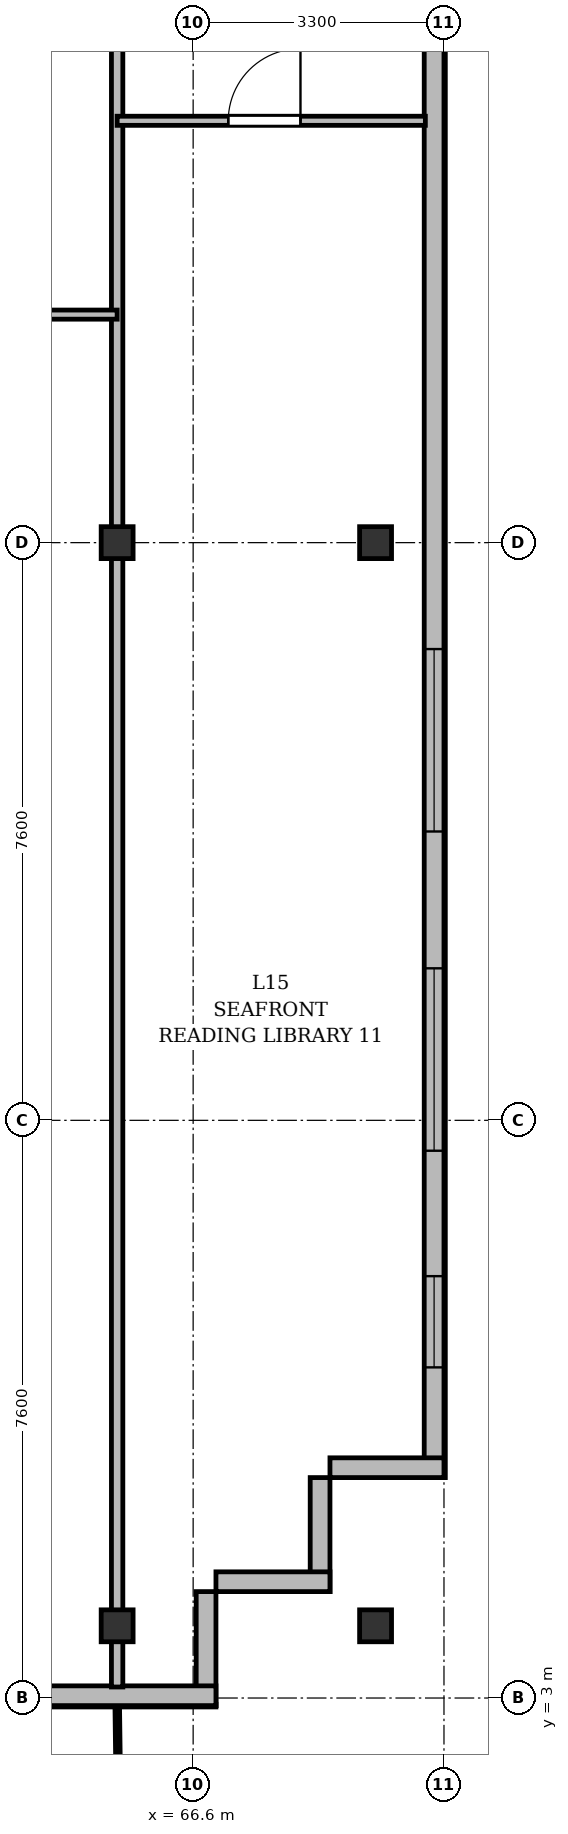
"""IFC4 building model, lengths in metres.
Left out: names, types, materials, properties, quantities, classifications, styles, units other than length and angle.
Written with IfcOpenShell. Run it as: python <this file> out.ifc"""

import sys

from ifc_helpers import new_model, si_unit, direction, frame, frame_2d, origin, origin_2d, place, context, subcontext, project, spatial, rectangle, i_section, extrude, source, transform, mapped, element, fill, save


model = new_model("IFC4")
c1 = context("Model", 3, precision=1e-05, world=origin(), true_north=direction((0.0, 1.0)))
c2 = subcontext(c1, "Body", "Model", "MODEL_VIEW")
j1 = project(units=[si_unit("LENGTHUNIT", "METRE"), si_unit("PLANEANGLEUNIT", "RADIAN")], contexts=[c1])
p1 = place(None, origin())
s1 = spatial("IfcSite", under=j1, at=p1, CompositionType="ELEMENT")
p2 = place(p1, origin())
s2 = spatial("IfcBuilding", under=s1, at=p2, CompositionType="ELEMENT")
p3 = place(p2, frame((0.0, 0.0, 59.5)))
s3 = spatial("IfcBuildingStorey", under=s2, at=p3, CompositionType="ELEMENT", Elevation=59.5)
m1 = source(origin(), c2, "Body", "SweptSolid", [
    extrude(i_section(OverallWidth=0.42, OverallDepth=0.42, WebThickness=0.026, FlangeThickness=0.04, at=origin_2d()), origin(), (0.0, 0.0, 1.0), 3.6),
])
for number, where, z_axis, x_axis in (
    (1, (65.6, 3.95, 0.0), (0.0, 0.0, 1.0), (1.0, 0.0, 0.0)),
    (2, (65.6, 18.2, 0.0), (0.0, 0.0, 1.0), (1.0, 0.0, 0.0)),
    (3, (69.0, 3.95, 0.0), (0.0, 0.0, 1.0), (1.0, 0.0, 0.0)),
    (4, (69.0, 18.2, 0.0), (0.0, 0.0, 1.0), (1.0, 0.0, 0.0)),
):
    element("IfcColumn", number, at=place(p3, frame(where, z_axis=z_axis, x_axis=x_axis)), inside=s3, PredefinedType="COLUMN", context=c2, shape_type="MappedRepresentation", body=[
        mapped(m1, transform((0.0, 0.0, 0.0), x_axis=(1.0, 0.0, 0.0), y_axis=(0.0, 1.0, 0.0), z_axis=(0.0, 0.0, 1.0), scale=1.0)),
    ])
p4 = place(p3, frame((69.77, 45.5, 0.0), z_axis=(0.0, 0.0, 1.0), x_axis=(0.0, -1.0, 0.0)))
e5 = element("IfcWall", 5, at=p4, inside=s3, PredefinedType="SOLIDWALL", context=c2, shape_type="SweptSolid", body=[
    extrude(rectangle(XDim=39.6, YDim=0.26, at=frame_2d((19.8, 0.0))), origin(), (0.0, 0.0, 1.0), 3.34),
])
p5 = place(p4, frame((36.95, 0.0, 0.92)))
e6 = element("IfcOpeningElement", 6, at=p5, cuts=e5, PredefinedType="OPENING", context=c2, shape_type="SweptSolid", body=[
    extrude(rectangle(XDim=1.2, YDim=1.65, at=frame_2d((0.6, 0.825))), frame((0.0, 0.14, 0.0), z_axis=(0.0, -1.0, 0.0), x_axis=(1.0, 0.0, 0.0)), (0.0, 0.0, 1.0), 0.28),
])
p6 = place(p4, frame((32.9, 0.0, 0.92)))
e7 = element("IfcOpeningElement", 7, at=p6, cuts=e5, PredefinedType="OPENING", context=c2, shape_type="SweptSolid", body=[
    extrude(rectangle(XDim=2.4, YDim=2.1, at=frame_2d((1.2, 1.05))), frame((0.0, 0.14, 0.0), z_axis=(0.0, -1.0, 0.0), x_axis=(1.0, 0.0, 0.0)), (0.0, 0.0, 1.0), 0.28),
])
p7 = place(p4, frame((28.7, 0.0, 0.92)))
e8 = element("IfcOpeningElement", 8, at=p7, cuts=e5, PredefinedType="OPENING", context=c2, shape_type="SweptSolid", body=[
    extrude(rectangle(XDim=2.4, YDim=2.1, at=frame_2d((1.2, 1.05))), frame((0.0, 0.14, 0.0), z_axis=(0.0, -1.0, 0.0), x_axis=(1.0, 0.0, 0.0)), (0.0, 0.0, 1.0), 0.28),
])
p8 = place(p4, frame((7.5, 0.0, 0.92)))
e9 = element("IfcOpeningElement", 9, at=p8, cuts=e5, PredefinedType="OPENING", context=c2, shape_type="SweptSolid", body=[
    extrude(rectangle(XDim=2.4, YDim=2.1, at=frame_2d((1.2, 1.05))), frame((0.0, 0.14, 0.0), z_axis=(0.0, -1.0, 0.0), x_axis=(1.0, 0.0, 0.0)), (0.0, 0.0, 1.0), 0.28),
])
p9 = place(p4, frame((4.5, 0.0, 0.92)))
e10 = element("IfcOpeningElement", 10, at=p9, cuts=e5, PredefinedType="OPENING", context=c2, shape_type="SweptSolid", body=[
    extrude(rectangle(XDim=1.2, YDim=1.65, at=frame_2d((0.6, 0.825))), frame((0.0, 0.14, 0.0), z_axis=(0.0, -1.0, 0.0), x_axis=(1.0, 0.0, 0.0)), (0.0, 0.0, 1.0), 0.28),
])
p10 = place(p4, frame((1.15, 0.0, 0.92)))
e11 = element("IfcOpeningElement", 11, at=p10, cuts=e5, PredefinedType="OPENING", context=c2, shape_type="SweptSolid", body=[
    extrude(rectangle(XDim=1.2, YDim=1.65, at=frame_2d((0.6, 0.825))), frame((0.0, 0.14, 0.0), z_axis=(0.0, -1.0, 0.0), x_axis=(1.0, 0.0, 0.0)), (0.0, 0.0, 1.0), 0.28),
])
p11 = place(p3, frame((69.9, 6.03, 0.0), z_axis=(0.0, 0.0, 1.0), x_axis=(-1.0, 0.0, 0.0)))
e12 = element("IfcWall", 12, at=p11, inside=s3, PredefinedType="SOLIDWALL", context=c2, shape_type="SweptSolid", body=[
    extrude(rectangle(XDim=1.5, YDim=0.26, at=frame_2d((0.75, 0.0))), origin(), (0.0, 0.0, 1.0), 2.752),
])
for number, where, z_axis, x_axis in (
    (13, (68.27, 5.9, 0.0), (0.0, 0.0, 1.0), (0.0, -1.0, 0.0)),
    (14, (68.4, 4.53, 0.0), (0.0, 0.0, 1.0), (-1.0, 0.0, 0.0)),
):
    element("IfcWall", number, at=place(p3, frame(where, z_axis=z_axis, x_axis=x_axis)), inside=s3, PredefinedType="SOLIDWALL", context=c2, shape_type="SweptSolid", body=[
        extrude(rectangle(XDim=1.5, YDim=0.26, at=frame_2d((0.75, 0.0))), origin(), (0.0, 0.0, 1.0), 3.34),
    ])
p12 = place(p3, frame((66.77, 4.4, 0.0), z_axis=(0.0, 0.0, 1.0), x_axis=(0.0, -1.0, 0.0)))
e15 = element("IfcWall", 15, at=p12, inside=s3, PredefinedType="SOLIDWALL", context=c2, shape_type="SweptSolid", body=[
    extrude(rectangle(XDim=1.5, YDim=0.26, at=frame_2d((0.75, 0.0))), origin(), (0.0, 0.0, 1.0), 2.69),
])
p13 = place(p3, frame((66.9, 3.03, 0.0), z_axis=(0.0, 0.0, 1.0), x_axis=(-1.0, 0.0, 0.0)))
e16 = element("IfcWall", 16, at=p13, inside=s3, PredefinedType="SOLIDWALL", context=c2, shape_type="SweptSolid", body=[
    extrude(rectangle(XDim=59.4, YDim=0.26, at=frame_2d((29.7, 0.0))), origin(), (0.0, 0.0, 1.0), 3.34),
])
p14 = place(p13, frame((3.6, 0.0, 0.9)))
e17 = element("IfcOpeningElement", 17, at=p14, cuts=e16, PredefinedType="OPENING", context=c2, shape_type="SweptSolid", body=[
    extrude(rectangle(XDim=2.2, YDim=1.8, at=frame_2d((1.1, 0.9))), frame((0.0, 0.14, 0.0), z_axis=(0.0, -1.0, 0.0), x_axis=(1.0, 0.0, 0.0)), (0.0, 0.0, 1.0), 0.28),
])
p15 = place(p13, frame((9.18, 0.0, 0.0)))
e18 = element("IfcOpeningElement", 18, at=p15, cuts=e16, PredefinedType="OPENING", context=c2, shape_type="SweptSolid", body=[
    extrude(rectangle(XDim=1.2, YDim=2.2, at=frame_2d((0.6, 1.1))), frame((0.0, 0.14, 0.0), z_axis=(0.0, -1.0, 0.0), x_axis=(1.0, 0.0, 0.0)), (0.0, 0.0, 1.0), 0.28),
])
p16 = place(p13, frame((12.95, 0.0, 0.9)))
e19 = element("IfcOpeningElement", 19, at=p16, cuts=e16, PredefinedType="OPENING", context=c2, shape_type="SweptSolid", body=[
    extrude(rectangle(XDim=2.0, YDim=1.95, at=frame_2d((1.0, 0.975))), frame((0.0, 0.14, 0.0), z_axis=(0.0, -1.0, 0.0), x_axis=(1.0, 0.0, 0.0)), (0.0, 0.0, 1.0), 0.28),
])
p17 = place(p13, frame((18.675, 0.0, 0.9)))
e20 = element("IfcOpeningElement", 20, at=p17, cuts=e16, PredefinedType="OPENING", context=c2, shape_type="SweptSolid", body=[
    extrude(rectangle(XDim=1.65, YDim=1.85, at=frame_2d((0.825, 0.925))), frame((0.0, 0.14, 0.0), z_axis=(0.0, -1.0, 0.0), x_axis=(1.0, 0.0, 0.0)), (0.0, 0.0, 1.0), 0.28),
])
p18 = place(p13, frame((24.1, 0.0, 0.9)))
e21 = element("IfcOpeningElement", 21, at=p18, cuts=e16, PredefinedType="OPENING", context=c2, shape_type="SweptSolid", body=[
    extrude(rectangle(XDim=1.8, YDim=1.8, at=frame_2d((0.9, 0.9))), frame((0.0, 0.14, 0.0), z_axis=(0.0, -1.0, 0.0), x_axis=(1.0, 0.0, 0.0)), (0.0, 0.0, 1.0), 0.28),
])
p19 = place(p13, frame((28.1, 0.0, 0.9)))
e22 = element("IfcOpeningElement", 22, at=p19, cuts=e16, PredefinedType="OPENING", context=c2, shape_type="SweptSolid", body=[
    extrude(rectangle(XDim=2.2, YDim=1.8, at=frame_2d((1.1, 0.9))), frame((0.0, 0.14, 0.0), z_axis=(0.0, -1.0, 0.0), x_axis=(1.0, 0.0, 0.0)), (0.0, 0.0, 1.0), 0.28),
])
p20 = place(p13, frame((33.15, 0.0, 0.9)))
e23 = element("IfcOpeningElement", 23, at=p20, cuts=e16, PredefinedType="OPENING", context=c2, shape_type="SweptSolid", body=[
    extrude(rectangle(XDim=1.5, YDim=1.75, at=frame_2d((0.75, 0.875))), frame((0.0, 0.14, 0.0), z_axis=(0.0, -1.0, 0.0), x_axis=(1.0, 0.0, 0.0)), (0.0, 0.0, 1.0), 0.28),
])
p21 = place(p13, frame((40.301, 0.0, 0.0)))
e24 = element("IfcOpeningElement", 24, at=p21, cuts=e16, PredefinedType="OPENING", context=c2, shape_type="SweptSolid", body=[
    extrude(rectangle(XDim=1.2, YDim=2.2, at=frame_2d((0.6, 1.1))), frame((0.0, 0.14, 0.0), z_axis=(0.0, -1.0, 0.0), x_axis=(1.0, 0.0, 0.0)), (0.0, 0.0, 1.0), 0.28),
])
p22 = place(p13, frame((46.575, 0.0, 0.9)))
e25 = element("IfcOpeningElement", 25, at=p22, cuts=e16, PredefinedType="OPENING", context=c2, shape_type="SweptSolid", body=[
    extrude(rectangle(XDim=1.65, YDim=1.85, at=frame_2d((0.825, 0.925))), frame((0.0, 0.14, 0.0), z_axis=(0.0, -1.0, 0.0), x_axis=(1.0, 0.0, 0.0)), (0.0, 0.0, 1.0), 0.28),
])
p23 = place(p13, frame((53.136, 0.0, 0.0)))
e26 = element("IfcOpeningElement", 26, at=p23, cuts=e16, PredefinedType="OPENING", context=c2, shape_type="SweptSolid", body=[
    extrude(rectangle(XDim=1.2, YDim=2.2, at=frame_2d((0.6, 1.1))), frame((0.0, 0.14, 0.0), z_axis=(0.0, -1.0, 0.0), x_axis=(1.0, 0.0, 0.0)), (0.0, 0.0, 1.0), 0.28),
])
p24 = place(p13, frame((55.3, 0.0, 0.9)))
e27 = element("IfcOpeningElement", 27, at=p24, cuts=e16, PredefinedType="OPENING", context=c2, shape_type="SweptSolid", body=[
    extrude(rectangle(XDim=2.2, YDim=1.8, at=frame_2d((1.1, 0.9))), frame((0.0, 0.14, 0.0), z_axis=(0.0, -1.0, 0.0), x_axis=(1.0, 0.0, 0.0)), (0.0, 0.0, 1.0), 0.28),
])
p25 = place(p3, frame((65.6, 3.145, 0.0), z_axis=(0.0, 0.0, 1.0), x_axis=(0.0, 1.0, 0.0)))
e28 = element("IfcWall", 28, at=p25, inside=s3, PredefinedType="PARTITIONING", context=c2, shape_type="SweptSolid", body=[
    extrude(rectangle(XDim=24.455, YDim=0.15, at=frame_2d((12.228, 0.0))), origin(), (0.0, 0.0, 1.0), 2.752),
])
p26 = place(p3, frame((58.8, 21.2, 0.0), z_axis=(0.0, 0.0, 1.0), x_axis=(1.0, 0.0, 0.0)))
e29 = element("IfcWall", 29, at=p26, inside=s3, PredefinedType="PARTITIONING", context=c2, shape_type="SweptSolid", body=[
    extrude(rectangle(XDim=6.8, YDim=0.12, at=frame_2d((3.4, 0.0))), origin(), (0.0, 0.0, 1.0), 2.752),
])
p27 = place(p26, frame((2.925, 0.0, 0.0)))
e30 = element("IfcOpeningElement", 30, at=p27, cuts=e29, PredefinedType="OPENING", context=c2, shape_type="SweptSolid", body=[
    extrude(rectangle(XDim=0.95, YDim=2.15, at=frame_2d((0.475, 1.075))), frame((0.0, 0.07, 0.0), z_axis=(0.0, -1.0, 0.0), x_axis=(1.0, 0.0, 0.0)), (0.0, 0.0, 1.0), 0.14),
])
p28 = place(p3, frame((65.6, 23.75, 0.0), z_axis=(0.0, 0.0, 1.0), x_axis=(1.0, 0.0, 0.0)))
e31 = element("IfcWall", 31, at=p28, inside=s3, PredefinedType="PARTITIONING", context=c2, shape_type="SweptSolid", body=[
    extrude(rectangle(XDim=4.055, YDim=0.12, at=frame_2d((2.027, 0.0))), origin(), (0.0, 0.0, 1.0), 2.752),
])
p29 = place(p28, frame((1.462, 0.0, 0.0)))
e32 = element("IfcOpeningElement", 32, at=p29, cuts=e31, PredefinedType="OPENING", context=c2, shape_type="SweptSolid", body=[
    extrude(rectangle(XDim=0.95, YDim=2.15, at=frame_2d((0.475, 1.075))), frame((0.0, 0.07, 0.0), z_axis=(0.0, -1.0, 0.0), x_axis=(1.0, 0.0, 0.0)), (0.0, 0.0, 1.0), 0.14),
])
m2 = source(origin(), c2, "Body", "SweptSolid", [
    extrude(rectangle(XDim=1.2, YDim=1.65, at=frame_2d((0.6, 0.825))), frame((0.0, 0.03, 0.0), z_axis=(0.0, -1.0, 0.0), x_axis=(1.0, 0.0, 0.0)), (0.0, 0.0, 1.0), 0.06),
])
p30 = place(p5, origin())
e33 = element("IfcWindow", 33, at=p30, inside=s3, PartitioningType="SINGLE_PANEL", PredefinedType="WINDOW", context=c2, shape_type="MappedRepresentation", body=[
    mapped(m2, transform((0.0, 0.0, 0.0), x_axis=(1.0, 0.0, 0.0), y_axis=(0.0, 1.0, 0.0), z_axis=(0.0, 0.0, 1.0), scale=1.0)),
])
fill(e6, e33)
m3 = source(origin(), c2, "Body", "SweptSolid", [
    extrude(rectangle(XDim=2.4, YDim=2.1, at=frame_2d((1.2, 1.05))), frame((0.0, 0.03, 0.0), z_axis=(0.0, -1.0, 0.0), x_axis=(1.0, 0.0, 0.0)), (0.0, 0.0, 1.0), 0.06),
])
p31 = place(p6, origin())
e34 = element("IfcWindow", 34, at=p31, inside=s3, PartitioningType="SINGLE_PANEL", PredefinedType="WINDOW", context=c2, shape_type="MappedRepresentation", body=[
    mapped(m3, transform((0.0, 0.0, 0.0), x_axis=(1.0, 0.0, 0.0), y_axis=(0.0, 1.0, 0.0), z_axis=(0.0, 0.0, 1.0), scale=1.0)),
])
fill(e7, e34)
p32 = place(p7, origin())
e35 = element("IfcWindow", 35, at=p32, inside=s3, PartitioningType="SINGLE_PANEL", PredefinedType="WINDOW", context=c2, shape_type="MappedRepresentation", body=[
    mapped(m3, transform((0.0, 0.0, 0.0), x_axis=(1.0, 0.0, 0.0), y_axis=(0.0, 1.0, 0.0), z_axis=(0.0, 0.0, 1.0), scale=1.0)),
])
fill(e8, e35)
m4 = source(origin(), c2, "Body", "SweptSolid", [
    extrude(rectangle(XDim=0.95, YDim=2.15, at=frame_2d((0.475, 1.075))), frame((0.0, 0.025, 0.0), z_axis=(0.0, -1.0, 0.0), x_axis=(1.0, 0.0, 0.0)), (0.0, 0.0, 1.0), 0.05),
])
p33 = place(p29, origin())
e36 = element("IfcDoor", 36, at=p33, inside=s3, OperationType="SINGLE_SWING_RIGHT", PredefinedType="DOOR", context=c2, shape_type="MappedRepresentation", body=[
    mapped(m4, transform((0.0, 0.0, 0.0), x_axis=(1.0, 0.0, 0.0), y_axis=(0.0, 1.0, 0.0), z_axis=(0.0, 0.0, 1.0), scale=1.0)),
])
fill(e32, e36)
save(model, sys.argv[1])
